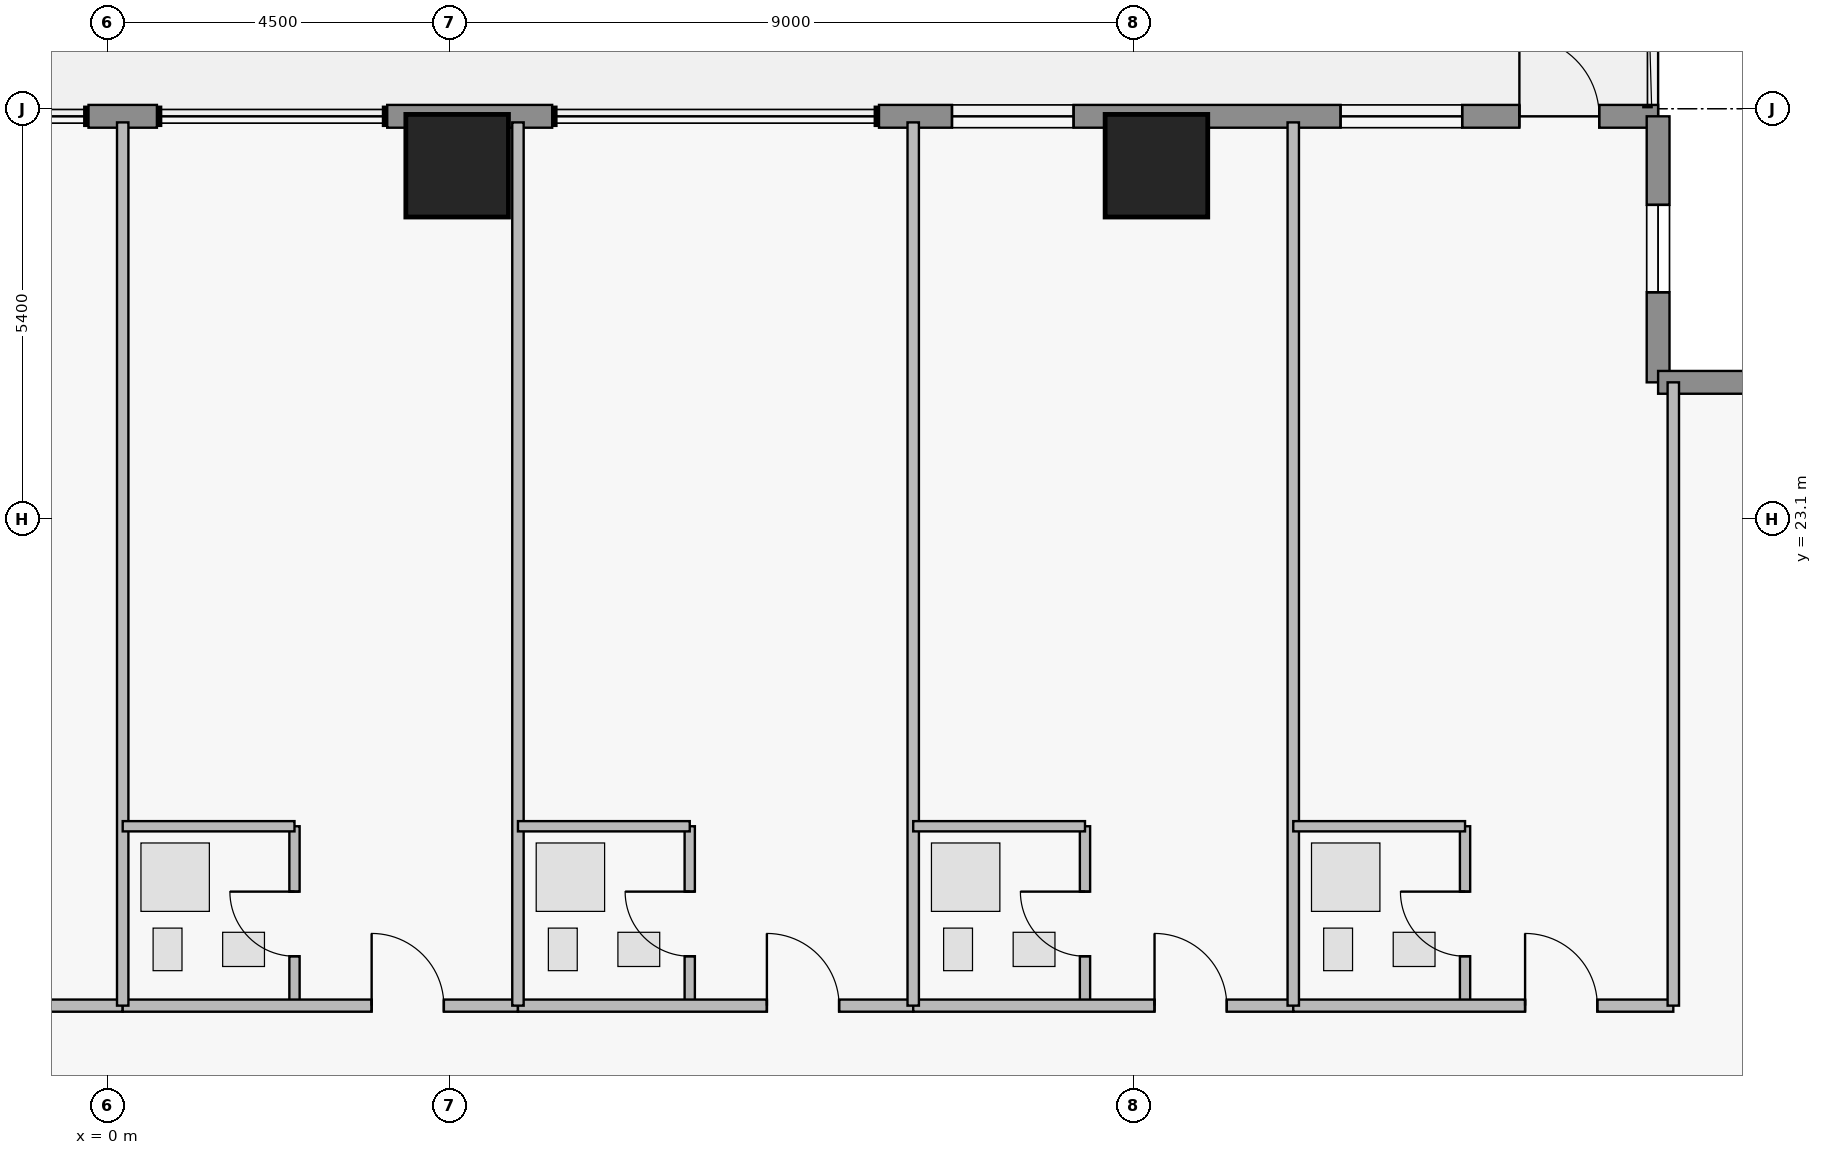
"""IFC4 building model, lengths in metres.
Left out: names, types, materials, properties, quantities, classifications, styles, units other than length and angle.
Written with IfcOpenShell. Run it as: python <this file> out.ifc"""

import sys

from ifc_helpers import new_model, si_unit, direction, frame, frame_2d, origin, origin_2d, place, context, subcontext, project, spatial, rectangle, extrude, element, fill, save


model = new_model("IFC4")
c1 = context("Model", 3, precision=1e-05, world=origin(), true_north=direction((0.0, 1.0)))
c2 = subcontext(c1, "Body", "Model", "MODEL_VIEW")
j1 = project(units=[si_unit("LENGTHUNIT", "METRE"), si_unit("PLANEANGLEUNIT", "RADIAN")], contexts=[c1])
p1 = place(None, origin())
s1 = spatial("IfcSite", under=j1, at=p1, CompositionType="ELEMENT")
p2 = place(p1, origin())
s2 = spatial("IfcBuilding", under=s1, at=p2, CompositionType="ELEMENT")
p3 = place(p2, frame((0.0, 0.0, 106.6)))
s3 = spatial("IfcBuildingStorey", under=s2, at=p3, CompositionType="ELEMENT", Elevation=106.6)
for number, where, z_axis, x_axis in (
    (1, (4.6, 27.75, 0.0), (0.0, 0.0, 1.0), (1.0, 0.0, 0.0)),
    (2, (13.8, 27.75, 0.0), (0.0, 0.0, 1.0), (1.0, 0.0, 0.0)),
):
    element("IfcColumn", number, at=place(p3, frame(where, z_axis=z_axis, x_axis=x_axis)), inside=s3, PredefinedType="COLUMN", context=c2, shape_type="SweptSolid", body=[
        extrude(rectangle(XDim=1.35, YDim=1.35, at=origin_2d()), origin(), (0.0, 0.0, 1.0), 3.65),
    ])
p4 = place(p3, frame((-0.25, 28.4, 0.0), z_axis=(0.0, 0.0, 1.0), x_axis=(1.0, 0.0, 0.0)))
e3 = element("IfcWall", 3, at=p4, inside=s3, PredefinedType="STANDARD", context=c2, shape_type="SweptSolid", body=[
    extrude(rectangle(XDim=0.9, YDim=0.3, at=frame_2d((0.45, 0.0))), origin(), (0.0, 0.0, 1.0), 3.43),
])
p5 = place(p3, frame((3.68, 28.4, 0.0), z_axis=(0.0, 0.0, 1.0), x_axis=(1.0, 0.0, 0.0)))
e4 = element("IfcWall", 4, at=p5, inside=s3, PredefinedType="STANDARD", context=c2, shape_type="SweptSolid", body=[
    extrude(rectangle(XDim=2.17, YDim=0.3, at=frame_2d((1.085, 0.0))), origin(), (0.0, 0.0, 1.0), 3.43),
])
p6 = place(p3, frame((10.15, 28.4, 0.0), z_axis=(0.0, 0.0, 1.0), x_axis=(1.0, 0.0, 0.0)))
e5 = element("IfcWall", 5, at=p6, inside=s3, PredefinedType="STANDARD", context=c2, shape_type="SweptSolid", body=[
    extrude(rectangle(XDim=10.25, YDim=0.3, at=frame_2d((5.125, 0.0))), origin(), (0.0, 0.0, 1.0), 3.43),
])
p7 = place(p6, frame((8.425, 0.0, 0.0)))
e6 = element("IfcOpeningElement", 6, at=p7, cuts=e5, PredefinedType="OPENING", context=c2, shape_type="SweptSolid", body=[
    extrude(rectangle(XDim=1.05, YDim=2.2, at=frame_2d((0.525, 1.1))), frame((0.0, 0.16, 0.0), z_axis=(0.0, -1.0, 0.0), x_axis=(1.0, 0.0, 0.0)), (0.0, 0.0, 1.0), 0.32),
])
p8 = place(p6, frame((0.96, 0.0, 0.85)))
e7 = element("IfcOpeningElement", 7, at=p8, cuts=e5, PredefinedType="OPENING", context=c2, shape_type="SweptSolid", body=[
    extrude(rectangle(XDim=1.6, YDim=1.8, at=frame_2d((0.8, 0.9))), frame((0.0, 0.16, 0.0), z_axis=(0.0, -1.0, 0.0), x_axis=(1.0, 0.0, 0.0)), (0.0, 0.0, 1.0), 0.32),
])
p9 = place(p6, frame((6.073, 0.0, 0.85)))
e8 = element("IfcOpeningElement", 8, at=p9, cuts=e5, PredefinedType="OPENING", context=c2, shape_type="SweptSolid", body=[
    extrude(rectangle(XDim=1.6, YDim=1.8, at=frame_2d((0.8, 0.9))), frame((0.0, 0.16, 0.0), z_axis=(0.0, -1.0, 0.0), x_axis=(1.0, 0.0, 0.0)), (0.0, 0.0, 1.0), 0.32),
])
p10 = place(p3, frame((20.4, 28.4, 0.0), z_axis=(0.0, 0.0, 1.0), x_axis=(0.0, -1.0, 0.0)))
e9 = element("IfcWall", 9, at=p10, inside=s3, PredefinedType="STANDARD", context=c2, shape_type="SweptSolid", body=[
    extrude(rectangle(XDim=3.5, YDim=0.3, at=frame_2d((1.75, 0.0))), origin(), (0.0, 0.0, 1.0), 3.43),
])
p11 = place(p10, frame((1.165, 0.0, 1.25)))
e10 = element("IfcOpeningElement", 10, at=p11, cuts=e9, PredefinedType="OPENING", context=c2, shape_type="SweptSolid", body=[
    extrude(rectangle(XDim=1.15, YDim=1.55, at=frame_2d((0.575, 0.775))), frame((0.0, 0.16, 0.0), z_axis=(0.0, -1.0, 0.0), x_axis=(1.0, 0.0, 0.0)), (0.0, 0.0, 1.0), 0.32),
])
p12 = place(p3, frame((20.4, 24.9, 0.0), z_axis=(0.0, 0.0, 1.0), x_axis=(1.0, 0.0, 0.0)))
e11 = element("IfcWall", 11, at=p12, inside=s3, PredefinedType="STANDARD", context=c2, shape_type="SweptSolid", body=[
    extrude(rectangle(XDim=3.5, YDim=0.3, at=frame_2d((1.75, 0.0))), origin(), (0.0, 0.0, 1.0), 3.43),
])
p13 = place(p12, frame((1.285, 0.0, 1.25)))
e12 = element("IfcOpeningElement", 12, at=p13, cuts=e11, PredefinedType="OPENING", context=c2, shape_type="SweptSolid", body=[
    extrude(rectangle(XDim=1.15, YDim=1.55, at=frame_2d((0.575, 0.775))), frame((0.0, 0.16, 0.0), z_axis=(0.0, -1.0, 0.0), x_axis=(1.0, 0.0, 0.0)), (0.0, 0.0, 1.0), 0.32),
])
p14 = place(p3, frame((-5.0, 16.7, 0.0), z_axis=(0.0, 0.0, 1.0), x_axis=(1.0, 0.0, 0.0)))
e13 = element("IfcWall", 13, at=p14, inside=s3, PredefinedType="PARTITIONING", context=c2, shape_type="SweptSolid", body=[
    extrude(rectangle(XDim=5.2, YDim=0.16, at=frame_2d((2.6, 0.0))), origin(), (0.0, 0.0, 1.0), 2.973),
])
p15 = place(p14, frame((3.275, 0.0, 0.0)))
e14 = element("IfcOpeningElement", 14, at=p15, cuts=e13, PredefinedType="OPENING", context=c2, shape_type="SweptSolid", body=[
    extrude(rectangle(XDim=0.95, YDim=2.15, at=frame_2d((0.475, 1.075))), frame((0.0, 0.09, 0.0), z_axis=(0.0, -1.0, 0.0), x_axis=(1.0, 0.0, 0.0)), (0.0, 0.0, 1.0), 0.18),
])
p16 = place(p3, frame((2.46, 16.7, 0.0), z_axis=(0.0, 0.0, 1.0), x_axis=(0.0, 1.0, 0.0)))
e15 = element("IfcWall", 15, at=p16, inside=s3, PredefinedType="PLUMBINGWALL", context=c2, shape_type="SweptSolid", body=[
    extrude(rectangle(XDim=2.36, YDim=0.135, at=frame_2d((1.18, 0.0))), origin(), (0.0, 0.0, 1.0), 3.43),
])
p17 = place(p16, frame((0.65, 0.0, 0.0)))
e16 = element("IfcOpeningElement", 16, at=p17, cuts=e15, PredefinedType="OPENING", context=c2, shape_type="SweptSolid", body=[
    extrude(rectangle(XDim=0.85, YDim=2.1, at=frame_2d((0.425, 1.05))), frame((0.0, 0.077, 0.0), z_axis=(0.0, -1.0, 0.0), x_axis=(1.0, 0.0, 0.0)), (0.0, 0.0, 1.0), 0.155),
])
p18 = place(p3, frame((0.2, 16.7, 0.0), z_axis=(0.0, 0.0, 1.0), x_axis=(1.0, 0.0, 0.0)))
e17 = element("IfcWall", 17, at=p18, inside=s3, PredefinedType="PARTITIONING", context=c2, shape_type="SweptSolid", body=[
    extrude(rectangle(XDim=5.2, YDim=0.16, at=frame_2d((2.6, 0.0))), origin(), (0.0, 0.0, 1.0), 2.973),
])
p19 = place(p18, frame((3.275, 0.0, 0.0)))
e18 = element("IfcOpeningElement", 18, at=p19, cuts=e17, PredefinedType="OPENING", context=c2, shape_type="SweptSolid", body=[
    extrude(rectangle(XDim=0.95, YDim=2.15, at=frame_2d((0.475, 1.075))), frame((0.0, 0.09, 0.0), z_axis=(0.0, -1.0, 0.0), x_axis=(1.0, 0.0, 0.0)), (0.0, 0.0, 1.0), 0.18),
])
p20 = place(p3, frame((7.66, 16.7, 0.0), z_axis=(0.0, 0.0, 1.0), x_axis=(0.0, 1.0, 0.0)))
e19 = element("IfcWall", 19, at=p20, inside=s3, PredefinedType="PLUMBINGWALL", context=c2, shape_type="SweptSolid", body=[
    extrude(rectangle(XDim=2.36, YDim=0.135, at=frame_2d((1.18, 0.0))), origin(), (0.0, 0.0, 1.0), 3.43),
])
p21 = place(p20, frame((0.65, 0.0, 0.0)))
e20 = element("IfcOpeningElement", 20, at=p21, cuts=e19, PredefinedType="OPENING", context=c2, shape_type="SweptSolid", body=[
    extrude(rectangle(XDim=0.85, YDim=2.1, at=frame_2d((0.425, 1.05))), frame((0.0, 0.077, 0.0), z_axis=(0.0, -1.0, 0.0), x_axis=(1.0, 0.0, 0.0)), (0.0, 0.0, 1.0), 0.155),
])
p22 = place(p3, frame((5.4, 16.7, 0.0), z_axis=(0.0, 0.0, 1.0), x_axis=(1.0, 0.0, 0.0)))
e21 = element("IfcWall", 21, at=p22, inside=s3, PredefinedType="PARTITIONING", context=c2, shape_type="SweptSolid", body=[
    extrude(rectangle(XDim=5.2, YDim=0.16, at=frame_2d((2.6, 0.0))), origin(), (0.0, 0.0, 1.0), 2.973),
])
p23 = place(p22, frame((3.275, 0.0, 0.0)))
e22 = element("IfcOpeningElement", 22, at=p23, cuts=e21, PredefinedType="OPENING", context=c2, shape_type="SweptSolid", body=[
    extrude(rectangle(XDim=0.95, YDim=2.15, at=frame_2d((0.475, 1.075))), frame((0.0, 0.09, 0.0), z_axis=(0.0, -1.0, 0.0), x_axis=(1.0, 0.0, 0.0)), (0.0, 0.0, 1.0), 0.18),
])
p24 = place(p3, frame((12.86, 16.7, 0.0), z_axis=(0.0, 0.0, 1.0), x_axis=(0.0, 1.0, 0.0)))
e23 = element("IfcWall", 23, at=p24, inside=s3, PredefinedType="PLUMBINGWALL", context=c2, shape_type="SweptSolid", body=[
    extrude(rectangle(XDim=2.36, YDim=0.135, at=frame_2d((1.18, 0.0))), origin(), (0.0, 0.0, 1.0), 3.43),
])
p25 = place(p24, frame((0.65, 0.0, 0.0)))
e24 = element("IfcOpeningElement", 24, at=p25, cuts=e23, PredefinedType="OPENING", context=c2, shape_type="SweptSolid", body=[
    extrude(rectangle(XDim=0.85, YDim=2.1, at=frame_2d((0.425, 1.05))), frame((0.0, 0.077, 0.0), z_axis=(0.0, -1.0, 0.0), x_axis=(1.0, 0.0, 0.0)), (0.0, 0.0, 1.0), 0.155),
])
p26 = place(p3, frame((10.6, 16.7, 0.0), z_axis=(0.0, 0.0, 1.0), x_axis=(1.0, 0.0, 0.0)))
e25 = element("IfcWall", 25, at=p26, inside=s3, PredefinedType="PARTITIONING", context=c2, shape_type="SweptSolid", body=[
    extrude(rectangle(XDim=5.0, YDim=0.16, at=frame_2d((2.5, 0.0))), origin(), (0.0, 0.0, 1.0), 2.973),
])
p27 = place(p26, frame((3.175, 0.0, 0.0)))
e26 = element("IfcOpeningElement", 26, at=p27, cuts=e25, PredefinedType="OPENING", context=c2, shape_type="SweptSolid", body=[
    extrude(rectangle(XDim=0.95, YDim=2.15, at=frame_2d((0.475, 1.075))), frame((0.0, 0.09, 0.0), z_axis=(0.0, -1.0, 0.0), x_axis=(1.0, 0.0, 0.0)), (0.0, 0.0, 1.0), 0.18),
])
p28 = place(p3, frame((17.86, 16.7, 0.0), z_axis=(0.0, 0.0, 1.0), x_axis=(0.0, 1.0, 0.0)))
e27 = element("IfcWall", 27, at=p28, inside=s3, PredefinedType="PLUMBINGWALL", context=c2, shape_type="SweptSolid", body=[
    extrude(rectangle(XDim=2.36, YDim=0.135, at=frame_2d((1.18, 0.0))), origin(), (0.0, 0.0, 1.0), 3.43),
])
p29 = place(p28, frame((0.65, 0.0, 0.0)))
e28 = element("IfcOpeningElement", 28, at=p29, cuts=e27, PredefinedType="OPENING", context=c2, shape_type="SweptSolid", body=[
    extrude(rectangle(XDim=0.85, YDim=2.1, at=frame_2d((0.425, 1.05))), frame((0.0, 0.077, 0.0), z_axis=(0.0, -1.0, 0.0), x_axis=(1.0, 0.0, 0.0)), (0.0, 0.0, 1.0), 0.155),
])
p30 = place(p3, frame((15.6, 16.7, 0.0), z_axis=(0.0, 0.0, 1.0), x_axis=(1.0, 0.0, 0.0)))
e29 = element("IfcWall", 29, at=p30, inside=s3, PredefinedType="PARTITIONING", context=c2, shape_type="SweptSolid", body=[
    extrude(rectangle(XDim=5.0, YDim=0.16, at=frame_2d((2.5, 0.0))), origin(), (0.0, 0.0, 1.0), 3.43),
])
p31 = place(p30, frame((3.05, 0.0, 0.0)))
e30 = element("IfcOpeningElement", 30, at=p31, cuts=e29, PredefinedType="OPENING", context=c2, shape_type="SweptSolid", body=[
    extrude(rectangle(XDim=0.95, YDim=2.15, at=frame_2d((0.475, 1.075))), frame((0.0, 0.09, 0.0), z_axis=(0.0, -1.0, 0.0), x_axis=(1.0, 0.0, 0.0)), (0.0, 0.0, 1.0), 0.18),
])
p32 = place(p3, frame((0.2, 16.7, 0.0), z_axis=(0.0, 0.0, 1.0), x_axis=(0.0, 1.0, 0.0)))
e31 = element("IfcWall", 31, at=p32, inside=s3, PredefinedType="PARTITIONING", context=c2, shape_type="SweptSolid", body=[
    extrude(rectangle(XDim=11.62, YDim=0.15, at=frame_2d((5.81, 0.0))), origin(), (0.0, 0.0, 1.0), 3.43),
])
p33 = place(p3, frame((0.2, 19.06, 0.0), z_axis=(0.0, 0.0, 1.0), x_axis=(1.0, 0.0, 0.0)))
e32 = element("IfcWall", 32, at=p33, inside=s3, PredefinedType="PLUMBINGWALL", context=c2, shape_type="SweptSolid", body=[
    extrude(rectangle(XDim=2.26, YDim=0.135, at=frame_2d((1.13, 0.0))), origin(), (0.0, 0.0, 1.0), 2.973),
])
p34 = place(p3, frame((5.4, 16.7, 0.0), z_axis=(0.0, 0.0, 1.0), x_axis=(0.0, 1.0, 0.0)))
e33 = element("IfcWall", 33, at=p34, inside=s3, PredefinedType="PARTITIONING", context=c2, shape_type="SweptSolid", body=[
    extrude(rectangle(XDim=11.62, YDim=0.15, at=frame_2d((5.81, 0.0))), origin(), (0.0, 0.0, 1.0), 3.43),
])
p35 = place(p3, frame((5.4, 19.06, 0.0), z_axis=(0.0, 0.0, 1.0), x_axis=(1.0, 0.0, 0.0)))
e34 = element("IfcWall", 34, at=p35, inside=s3, PredefinedType="PLUMBINGWALL", context=c2, shape_type="SweptSolid", body=[
    extrude(rectangle(XDim=2.26, YDim=0.135, at=frame_2d((1.13, 0.0))), origin(), (0.0, 0.0, 1.0), 2.973),
])
p36 = place(p3, frame((10.6, 16.7, 0.0), z_axis=(0.0, 0.0, 1.0), x_axis=(0.0, 1.0, 0.0)))
e35 = element("IfcWall", 35, at=p36, inside=s3, PredefinedType="PARTITIONING", context=c2, shape_type="SweptSolid", body=[
    extrude(rectangle(XDim=11.62, YDim=0.15, at=frame_2d((5.81, 0.0))), origin(), (0.0, 0.0, 1.0), 3.43),
])
p37 = place(p3, frame((10.6, 19.06, 0.0), z_axis=(0.0, 0.0, 1.0), x_axis=(1.0, 0.0, 0.0)))
e36 = element("IfcWall", 36, at=p37, inside=s3, PredefinedType="PLUMBINGWALL", context=c2, shape_type="SweptSolid", body=[
    extrude(rectangle(XDim=2.26, YDim=0.135, at=frame_2d((1.13, 0.0))), origin(), (0.0, 0.0, 1.0), 2.973),
])
p38 = place(p3, frame((15.6, 16.7, 0.0), z_axis=(0.0, 0.0, 1.0), x_axis=(0.0, 1.0, 0.0)))
e37 = element("IfcWall", 37, at=p38, inside=s3, PredefinedType="PARTITIONING", context=c2, shape_type="SweptSolid", body=[
    extrude(rectangle(XDim=11.62, YDim=0.15, at=frame_2d((5.81, 0.0))), origin(), (0.0, 0.0, 1.0), 3.43),
])
p39 = place(p3, frame((15.6, 19.06, 0.0), z_axis=(0.0, 0.0, 1.0), x_axis=(1.0, 0.0, 0.0)))
e38 = element("IfcWall", 38, at=p39, inside=s3, PredefinedType="PLUMBINGWALL", context=c2, shape_type="SweptSolid", body=[
    extrude(rectangle(XDim=2.26, YDim=0.135, at=frame_2d((1.13, 0.0))), origin(), (0.0, 0.0, 1.0), 3.43),
])
p40 = place(p3, frame((20.6, 16.7, 0.0), z_axis=(0.0, 0.0, 1.0), x_axis=(0.0, 1.0, 0.0)))
e39 = element("IfcWall", 39, at=p40, inside=s3, PredefinedType="PARTITIONING", context=c2, shape_type="SweptSolid", body=[
    extrude(rectangle(XDim=8.2, YDim=0.15, at=frame_2d((4.1, 0.0))), origin(), (0.0, 0.0, 1.0), 3.43),
])
p41 = place(p7, origin())
e40 = element("IfcDoor", 40, at=p41, inside=s3, OperationType="SINGLE_SWING_LEFT", PredefinedType="DOOR", context=c2, shape_type="SweptSolid", body=[
    extrude(rectangle(XDim=1.05, YDim=2.2, at=frame_2d((0.525, 1.1))), frame((0.0, 0.025, 0.0), z_axis=(0.0, -1.0, 0.0), x_axis=(1.0, 0.0, 0.0)), (0.0, 0.0, 1.0), 0.05),
])
fill(e6, e40)
p42 = place(p8, origin())
e41 = element("IfcWindow", 41, at=p42, inside=s3, PartitioningType="SINGLE_PANEL", PredefinedType="WINDOW", context=c2, shape_type="SweptSolid", body=[
    extrude(rectangle(XDim=1.6, YDim=1.8, at=frame_2d((0.8, 0.9))), frame((0.0, 0.03, 0.0), z_axis=(0.0, -1.0, 0.0), x_axis=(1.0, 0.0, 0.0)), (0.0, 0.0, 1.0), 0.06),
])
fill(e7, e41)
p43 = place(p9, origin())
e42 = element("IfcWindow", 42, at=p43, inside=s3, PartitioningType="SINGLE_PANEL", PredefinedType="WINDOW", context=c2, shape_type="SweptSolid", body=[
    extrude(rectangle(XDim=1.6, YDim=1.8, at=frame_2d((0.8, 0.9))), frame((0.0, 0.03, 0.0), z_axis=(0.0, -1.0, 0.0), x_axis=(1.0, 0.0, 0.0)), (0.0, 0.0, 1.0), 0.06),
])
fill(e8, e42)
p44 = place(p11, origin())
e43 = element("IfcWindow", 43, at=p44, inside=s3, PartitioningType="SINGLE_PANEL", PredefinedType="WINDOW", context=c2, shape_type="SweptSolid", body=[
    extrude(rectangle(XDim=1.15, YDim=1.55, at=frame_2d((0.575, 0.775))), frame((0.0, 0.03, 0.0), z_axis=(0.0, -1.0, 0.0), x_axis=(1.0, 0.0, 0.0)), (0.0, 0.0, 1.0), 0.06),
])
fill(e10, e43)
p45 = place(p17, origin())
e44 = element("IfcDoor", 44, at=p45, inside=s3, OperationType="SINGLE_SWING_RIGHT", PredefinedType="DOOR", context=c2, shape_type="SweptSolid", body=[
    extrude(rectangle(XDim=0.85, YDim=2.1, at=frame_2d((0.425, 1.05))), frame((0.0, 0.025, 0.0), z_axis=(0.0, -1.0, 0.0), x_axis=(1.0, 0.0, 0.0)), (0.0, 0.0, 1.0), 0.05),
])
fill(e16, e44)
p46 = place(p19, origin())
e45 = element("IfcDoor", 45, at=p46, inside=s3, OperationType="SINGLE_SWING_LEFT", PredefinedType="DOOR", context=c2, shape_type="SweptSolid", body=[
    extrude(rectangle(XDim=0.95, YDim=2.15, at=frame_2d((0.475, 1.075))), frame((0.0, 0.025, 0.0), z_axis=(0.0, -1.0, 0.0), x_axis=(1.0, 0.0, 0.0)), (0.0, 0.0, 1.0), 0.05),
])
fill(e18, e45)
p47 = place(p21, origin())
e46 = element("IfcDoor", 46, at=p47, inside=s3, OperationType="SINGLE_SWING_RIGHT", PredefinedType="DOOR", context=c2, shape_type="SweptSolid", body=[
    extrude(rectangle(XDim=0.85, YDim=2.1, at=frame_2d((0.425, 1.05))), frame((0.0, 0.025, 0.0), z_axis=(0.0, -1.0, 0.0), x_axis=(1.0, 0.0, 0.0)), (0.0, 0.0, 1.0), 0.05),
])
fill(e20, e46)
p48 = place(p23, origin())
e47 = element("IfcDoor", 47, at=p48, inside=s3, OperationType="SINGLE_SWING_LEFT", PredefinedType="DOOR", context=c2, shape_type="SweptSolid", body=[
    extrude(rectangle(XDim=0.95, YDim=2.15, at=frame_2d((0.475, 1.075))), frame((0.0, 0.025, 0.0), z_axis=(0.0, -1.0, 0.0), x_axis=(1.0, 0.0, 0.0)), (0.0, 0.0, 1.0), 0.05),
])
fill(e22, e47)
p49 = place(p25, origin())
e48 = element("IfcDoor", 48, at=p49, inside=s3, OperationType="SINGLE_SWING_RIGHT", PredefinedType="DOOR", context=c2, shape_type="SweptSolid", body=[
    extrude(rectangle(XDim=0.85, YDim=2.1, at=frame_2d((0.425, 1.05))), frame((0.0, 0.025, 0.0), z_axis=(0.0, -1.0, 0.0), x_axis=(1.0, 0.0, 0.0)), (0.0, 0.0, 1.0), 0.05),
])
fill(e24, e48)
p50 = place(p27, origin())
e49 = element("IfcDoor", 49, at=p50, inside=s3, OperationType="SINGLE_SWING_LEFT", PredefinedType="DOOR", context=c2, shape_type="SweptSolid", body=[
    extrude(rectangle(XDim=0.95, YDim=2.15, at=frame_2d((0.475, 1.075))), frame((0.0, 0.025, 0.0), z_axis=(0.0, -1.0, 0.0), x_axis=(1.0, 0.0, 0.0)), (0.0, 0.0, 1.0), 0.05),
])
fill(e26, e49)
p51 = place(p29, origin())
e50 = element("IfcDoor", 50, at=p51, inside=s3, OperationType="SINGLE_SWING_RIGHT", PredefinedType="DOOR", context=c2, shape_type="SweptSolid", body=[
    extrude(rectangle(XDim=0.85, YDim=2.1, at=frame_2d((0.425, 1.05))), frame((0.0, 0.025, 0.0), z_axis=(0.0, -1.0, 0.0), x_axis=(1.0, 0.0, 0.0)), (0.0, 0.0, 1.0), 0.05),
])
fill(e28, e50)
p52 = place(p31, origin())
e51 = element("IfcDoor", 51, at=p52, inside=s3, OperationType="SINGLE_SWING_LEFT", PredefinedType="DOOR", context=c2, shape_type="SweptSolid", body=[
    extrude(rectangle(XDim=0.95, YDim=2.15, at=frame_2d((0.475, 1.075))), frame((0.0, 0.025, 0.0), z_axis=(0.0, -1.0, 0.0), x_axis=(1.0, 0.0, 0.0)), (0.0, 0.0, 1.0), 0.05),
])
fill(e30, e51)
save(model, sys.argv[1])
